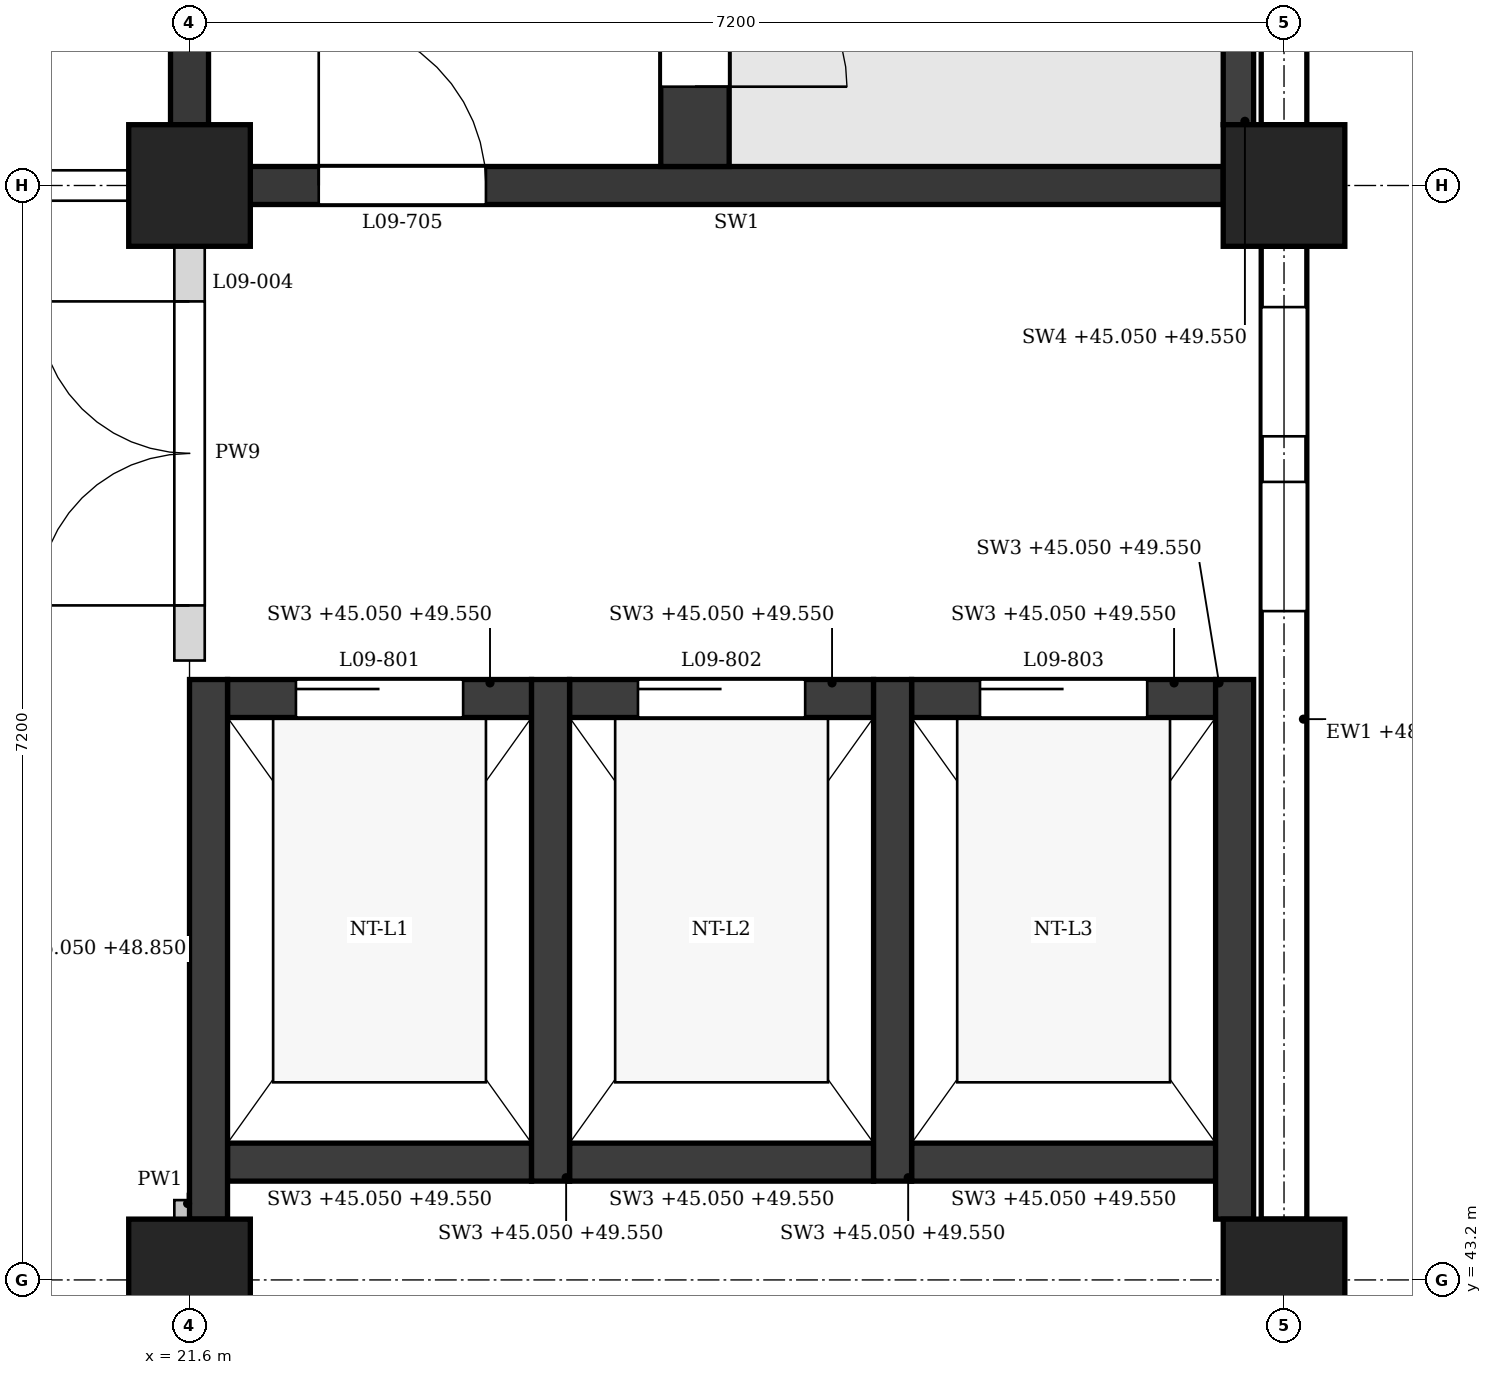
"""IFC4 building model, lengths in metres.
Left out: names, types, materials, properties, quantities, classifications, styles, units other than length and angle.
Written with IfcOpenShell. Run it as: python <this file> out.ifc"""

import sys

from ifc_helpers import new_model, si_unit, direction, frame, frame_2d, origin, origin_2d, place, context, subcontext, project, spatial, polyline, rectangle, outline, extrude, element, fill, save


model = new_model("IFC4")
c1 = context("Model", 3, precision=1e-05, world=origin(), true_north=direction((0.0, 1.0)))
c2 = subcontext(c1, "Body", "Model", "MODEL_VIEW")
j1 = project(units=[si_unit("LENGTHUNIT", "METRE"), si_unit("PLANEANGLEUNIT", "RADIAN")], contexts=[c1])
p1 = place(None, origin())
s1 = spatial("IfcSite", under=j1, at=p1, CompositionType="ELEMENT")
p2 = place(p1, origin())
s2 = spatial("IfcBuilding", under=s1, at=p2, CompositionType="ELEMENT")
p3 = place(p2, frame((0.0, 0.0, 45.3)))
s3 = spatial("IfcBuildingStorey", under=s2, at=p3, CompositionType="ELEMENT", Elevation=45.3)
for number, where, z_axis, x_axis in (
    (1, (21.6, 43.2, 0.0), (0.0, 0.0, 1.0), (1.0, 0.0, 0.0)),
    (2, (21.6, 50.4, 0.0), (0.0, 0.0, 1.0), (1.0, 0.0, 0.0)),
    (3, (28.8, 43.2, 0.0), (0.0, 0.0, 1.0), (1.0, 0.0, 0.0)),
    (4, (28.8, 50.4, 0.0), (0.0, 0.0, 1.0), (1.0, 0.0, 0.0)),
):
    element("IfcColumn", number, at=place(p3, frame(where, z_axis=z_axis, x_axis=x_axis)), inside=s3, PredefinedType="COLUMN", context=c2, shape_type="SweptSolid", body=[
        extrude(rectangle(XDim=0.8, YDim=0.8, at=origin_2d()), origin(), (0.0, 0.0, 1.0), 4.5),
    ])
p4 = place(p3, frame((28.8, 43.6, 0.0), z_axis=(0.0, 0.0, 1.0), x_axis=(0.0, 1.0, 0.0)))
e5 = element("IfcWall", 5, at=p4, inside=s3, PredefinedType="STANDARD", context=c2, shape_type="SweptSolid", body=[
    extrude(rectangle(XDim=6.4, YDim=0.3, at=frame_2d((3.2, 0.0))), origin(), (0.0, 0.0, 1.0), 3.65),
])
p5 = place(p4, frame((4.0, 0.0, 0.9)))
e6 = element("IfcOpeningElement", 6, at=p5, cuts=e5, PredefinedType="OPENING", context=c2, shape_type="SweptSolid", body=[
    extrude(outline(polyline([(0.0, 0.0), (0.85, 0.0), (0.85, 2.25), (0.425, 2.7), (0.0, 2.25), (0.0, 0.0)])), frame((0.0, 0.16, 0.0), z_axis=(0.0, -1.0, 0.0), x_axis=(1.0, 0.0, 0.0)), (0.0, 0.0, 1.0), 0.32),
])
p6 = place(p4, frame((5.15, 0.0, 0.9)))
e7 = element("IfcOpeningElement", 7, at=p6, cuts=e5, PredefinedType="OPENING", context=c2, shape_type="SweptSolid", body=[
    extrude(outline(polyline([(0.0, 0.0), (0.85, 0.0), (0.85, 2.25), (0.425, 2.7), (0.0, 2.25), (0.0, 0.0)])), frame((0.0, 0.16, 0.0), z_axis=(0.0, -1.0, 0.0), x_axis=(1.0, 0.0, 0.0)), (0.0, 0.0, 1.0), 0.32),
])
p7 = place(p3, frame((28.8, 50.8, 0.0), z_axis=(0.0, 0.0, 1.0), x_axis=(0.0, 1.0, 0.0)))
e8 = element("IfcWall", 8, at=p7, inside=s3, PredefinedType="STANDARD", context=c2, shape_type="SweptSolid", body=[
    extrude(rectangle(XDim=6.4, YDim=0.3, at=frame_2d((3.2, 0.0))), origin(), (0.0, 0.0, 1.0), 3.65),
])
p8 = place(p7, frame((0.95, 0.0, 0.9)))
e9 = element("IfcOpeningElement", 9, at=p8, cuts=e8, PredefinedType="OPENING", context=c2, shape_type="SweptSolid", body=[
    extrude(outline(polyline([(0.0, 0.0), (0.9, 0.0), (0.9, 2.25), (0.45, 2.7), (0.0, 2.25), (0.0, 0.0)])), frame((0.0, 0.16, 0.0), z_axis=(0.0, -1.0, 0.0), x_axis=(1.0, 0.0, 0.0)), (0.0, 0.0, 1.0), 0.32),
])
p9 = place(p7, frame((4.55, 0.0, 0.9)))
e10 = element("IfcOpeningElement", 10, at=p9, cuts=e8, PredefinedType="OPENING", context=c2, shape_type="SweptSolid", body=[
    extrude(outline(polyline([(0.0, 0.0), (0.9, 0.0), (0.9, 2.25), (0.45, 2.7), (0.0, 2.25), (0.0, 0.0)])), frame((0.0, 0.16, 0.0), z_axis=(0.0, -1.0, 0.0), x_axis=(1.0, 0.0, 0.0)), (0.0, 0.0, 1.0), 0.32),
])
p10 = place(p3, frame((22.0, 50.4, 0.0), z_axis=(0.0, 0.0, 1.0), x_axis=(1.0, 0.0, 0.0)))
e11 = element("IfcWall", 11, at=p10, inside=s3, PredefinedType="SHEAR", context=c2, shape_type="SweptSolid", body=[
    extrude(rectangle(XDim=6.4, YDim=0.25, at=frame_2d((3.2, 0.0))), origin(), (0.0, 0.0, 1.0), 3.55),
])
p11 = place(p10, frame((0.45, 0.0, 0.0)))
e12 = element("IfcOpeningElement", 12, at=p11, cuts=e11, PredefinedType="OPENING", context=c2, shape_type="SweptSolid", body=[
    extrude(rectangle(XDim=1.1, YDim=2.1, at=frame_2d((0.55, 1.05))), frame((0.0, 0.135, 0.0), z_axis=(0.0, -1.0, 0.0), x_axis=(1.0, 0.0, 0.0)), (0.0, 0.0, 1.0), 0.27),
])
p12 = place(p3, frame((21.6, 50.8, 0.0), z_axis=(0.0, 0.0, 1.0), x_axis=(0.0, 1.0, 0.0)))
e13 = element("IfcWall", 13, at=p12, inside=s3, PredefinedType="SHEAR", context=c2, shape_type="SweptSolid", body=[
    extrude(rectangle(XDim=6.4, YDim=0.25, at=frame_2d((3.2, 0.0))), origin(), (0.0, 0.0, 1.0), 3.55),
])
p13 = place(p3, frame((28.5, 50.8, -0.25), z_axis=(0.0, 0.0, 1.0), x_axis=(0.0, 1.0, 0.0)))
e14 = element("IfcWall", 14, at=p13, inside=s3, PredefinedType="SHEAR", context=c2, shape_type="SweptSolid", body=[
    extrude(rectangle(XDim=0.95, YDim=0.2, at=frame_2d((0.475, 0.0))), origin(), (0.0, 0.0, 1.0), 4.5),
])
p14 = place(p3, frame((24.925, 50.525, 0.0), z_axis=(0.0, 0.0, 1.0), x_axis=(0.0, 1.0, 0.0)))
e15 = element("IfcWall", 15, at=p14, inside=s3, PredefinedType="SHEAR", context=c2, shape_type="SweptSolid", body=[
    extrude(rectangle(XDim=6.925, YDim=0.45, at=frame_2d((3.462, 0.0))), origin(), (0.0, 0.0, 1.0), 4.25),
])
p15 = place(p14, frame((0.525, 0.0, 0.0)))
e16 = element("IfcOpeningElement", 16, at=p15, cuts=e15, PredefinedType="OPENING", context=c2, shape_type="SweptSolid", body=[
    extrude(rectangle(XDim=1.0, YDim=2.1, at=frame_2d((0.5, 1.05))), frame((0.0, 0.235, 0.0), z_axis=(0.0, -1.0, 0.0), x_axis=(1.0, 0.0, 0.0)), (0.0, 0.0, 1.0), 0.47),
])
p16 = place(p3, frame((21.725, 43.6, -0.25), z_axis=(0.0, 0.0, 1.0), x_axis=(0.0, 1.0, 0.0)))
e17 = element("IfcWall", 17, at=p16, inside=s3, PredefinedType="SHEAR", context=c2, shape_type="SweptSolid", body=[
    extrude(rectangle(XDim=3.55, YDim=0.25, at=frame_2d((1.775, 0.0))), origin(), (0.0, 0.0, 1.0), 3.8),
])
for number, where, z_axis, x_axis in (
    (18, (23.975, 43.85, -0.25), (0.0, 0.0, 1.0), (0.0, 1.0, 0.0)),
    (19, (26.225, 43.85, -0.25), (0.0, 0.0, 1.0), (0.0, 1.0, 0.0)),
):
    element("IfcWall", number, at=place(p3, frame(where, z_axis=z_axis, x_axis=x_axis)), inside=s3, PredefinedType="SHEAR", context=c2, shape_type="SweptSolid", body=[
        extrude(rectangle(XDim=3.3, YDim=0.25, at=frame_2d((1.65, 0.0))), origin(), (0.0, 0.0, 1.0), 4.5),
    ])
p17 = place(p3, frame((28.475, 43.6, -0.25), z_axis=(0.0, 0.0, 1.0), x_axis=(0.0, 1.0, 0.0)))
e20 = element("IfcWall", 20, at=p17, inside=s3, PredefinedType="SHEAR", context=c2, shape_type="SweptSolid", body=[
    extrude(rectangle(XDim=3.55, YDim=0.25, at=frame_2d((1.775, 0.0))), origin(), (0.0, 0.0, 1.0), 4.5),
])
p18 = place(p3, frame((21.85, 47.025, -0.25), z_axis=(0.0, 0.0, 1.0), x_axis=(1.0, 0.0, 0.0)))
e21 = element("IfcWall", 21, at=p18, inside=s3, PredefinedType="SHEAR", context=c2, shape_type="SweptSolid", body=[
    extrude(rectangle(XDim=2.0, YDim=0.25, at=frame_2d((1.0, 0.0))), origin(), (0.0, 0.0, 1.0), 4.5),
])
p19 = place(p18, frame((0.45, 0.0, 0.25)))
e22 = element("IfcOpeningElement", 22, at=p19, cuts=e21, PredefinedType="OPENING", context=c2, shape_type="SweptSolid", body=[
    extrude(rectangle(XDim=1.1, YDim=2.1, at=frame_2d((0.55, 1.05))), frame((0.0, 0.135, 0.0), z_axis=(0.0, -1.0, 0.0), x_axis=(1.0, 0.0, 0.0)), (0.0, 0.0, 1.0), 0.27),
])
p20 = place(p3, frame((21.85, 43.975, -0.25), z_axis=(0.0, 0.0, 1.0), x_axis=(1.0, 0.0, 0.0)))
e23 = element("IfcWall", 23, at=p20, inside=s3, PredefinedType="SHEAR", context=c2, shape_type="SweptSolid", body=[
    extrude(rectangle(XDim=2.0, YDim=0.25, at=frame_2d((1.0, 0.0))), origin(), (0.0, 0.0, 1.0), 4.5),
])
p21 = place(p3, frame((24.1, 47.025, -0.25), z_axis=(0.0, 0.0, 1.0), x_axis=(1.0, 0.0, 0.0)))
e24 = element("IfcWall", 24, at=p21, inside=s3, PredefinedType="SHEAR", context=c2, shape_type="SweptSolid", body=[
    extrude(rectangle(XDim=2.0, YDim=0.25, at=frame_2d((1.0, 0.0))), origin(), (0.0, 0.0, 1.0), 4.5),
])
p22 = place(p21, frame((0.45, 0.0, 0.25)))
e25 = element("IfcOpeningElement", 25, at=p22, cuts=e24, PredefinedType="OPENING", context=c2, shape_type="SweptSolid", body=[
    extrude(rectangle(XDim=1.1, YDim=2.1, at=frame_2d((0.55, 1.05))), frame((0.0, 0.135, 0.0), z_axis=(0.0, -1.0, 0.0), x_axis=(1.0, 0.0, 0.0)), (0.0, 0.0, 1.0), 0.27),
])
p23 = place(p3, frame((24.1, 43.975, -0.25), z_axis=(0.0, 0.0, 1.0), x_axis=(1.0, 0.0, 0.0)))
e26 = element("IfcWall", 26, at=p23, inside=s3, PredefinedType="SHEAR", context=c2, shape_type="SweptSolid", body=[
    extrude(rectangle(XDim=2.0, YDim=0.25, at=frame_2d((1.0, 0.0))), origin(), (0.0, 0.0, 1.0), 4.5),
])
p24 = place(p3, frame((26.35, 47.025, -0.25), z_axis=(0.0, 0.0, 1.0), x_axis=(1.0, 0.0, 0.0)))
e27 = element("IfcWall", 27, at=p24, inside=s3, PredefinedType="SHEAR", context=c2, shape_type="SweptSolid", body=[
    extrude(rectangle(XDim=2.0, YDim=0.25, at=frame_2d((1.0, 0.0))), origin(), (0.0, 0.0, 1.0), 4.5),
])
p25 = place(p24, frame((0.45, 0.0, 0.25)))
e28 = element("IfcOpeningElement", 28, at=p25, cuts=e27, PredefinedType="OPENING", context=c2, shape_type="SweptSolid", body=[
    extrude(rectangle(XDim=1.1, YDim=2.1, at=frame_2d((0.55, 1.05))), frame((0.0, 0.135, 0.0), z_axis=(0.0, -1.0, 0.0), x_axis=(1.0, 0.0, 0.0)), (0.0, 0.0, 1.0), 0.27),
])
p26 = place(p3, frame((26.35, 43.975, -0.25), z_axis=(0.0, 0.0, 1.0), x_axis=(1.0, 0.0, 0.0)))
e29 = element("IfcWall", 29, at=p26, inside=s3, PredefinedType="SHEAR", context=c2, shape_type="SweptSolid", body=[
    extrude(rectangle(XDim=2.0, YDim=0.25, at=frame_2d((1.0, 0.0))), origin(), (0.0, 0.0, 1.0), 4.5),
])
p27 = place(p3, frame((14.8, 50.4, 0.0), z_axis=(0.0, 0.0, 1.0), x_axis=(1.0, 0.0, 0.0)))
e30 = element("IfcWall", 30, at=p27, inside=s3, PredefinedType="PARTITIONING", context=c2, shape_type="SweptSolid", body=[
    extrude(rectangle(XDim=6.4, YDim=0.2, at=frame_2d((3.2, 0.0))), origin(), (0.0, 0.0, 1.0), 3.55),
])
p28 = place(p27, frame((4.3, 0.0, 0.0)))
e31 = element("IfcOpeningElement", 31, at=p28, cuts=e30, PredefinedType="OPENING", context=c2, shape_type="SweptSolid", body=[
    extrude(rectangle(XDim=1.0, YDim=2.1, at=frame_2d((0.5, 1.05))), frame((0.0, 0.11, 0.0), z_axis=(0.0, -1.0, 0.0), x_axis=(1.0, 0.0, 0.0)), (0.0, 0.0, 1.0), 0.22),
])
p29 = place(p3, frame((21.6, 43.6, 0.0), z_axis=(0.0, 0.0, 1.0), x_axis=(0.0, 1.0, 0.0)))
e32 = element("IfcWall", 32, at=p29, inside=s3, PredefinedType="PARTITIONING", context=c2, shape_type="SweptSolid", body=[
    extrude(rectangle(XDim=0.125, YDim=0.2, at=frame_2d((0.062, 0.0))), origin(), (0.0, 0.0, 1.0), 3.55),
])
p30 = place(p3, frame((21.6, 47.275, 0.0), z_axis=(0.0, 0.0, 1.0), x_axis=(0.0, 1.0, 0.0)))
e33 = element("IfcWall", 33, at=p30, inside=s3, PredefinedType="PARTITIONING", context=c2, shape_type="SweptSolid", body=[
    extrude(rectangle(XDim=2.725, YDim=0.2, at=frame_2d((1.363, 0.0))), origin(), (0.0, 0.0, 1.0), 3.55),
])
p31 = place(p30, frame((0.363, 0.0, 0.0)))
e34 = element("IfcOpeningElement", 34, at=p31, cuts=e33, PredefinedType="OPENING", context=c2, shape_type="SweptSolid", body=[
    extrude(rectangle(XDim=2.0, YDim=2.4, at=frame_2d((1.0, 1.2))), frame((0.0, 0.11, 0.0), z_axis=(0.0, -1.0, 0.0), x_axis=(1.0, 0.0, 0.0)), (0.0, 0.0, 1.0), 0.22),
])
p32 = place(p5, origin())
e35 = element("IfcWindow", 35, at=p32, inside=s3, PartitioningType="SINGLE_PANEL", PredefinedType="WINDOW", context=c2, shape_type="SweptSolid", body=[
    extrude(outline(polyline([(0.0, 0.0), (0.85, 0.0), (0.85, 2.25), (0.425, 2.7), (0.0, 2.25), (0.0, 0.0)])), frame((0.0, 0.03, 0.0), z_axis=(0.0, -1.0, 0.0), x_axis=(1.0, 0.0, 0.0)), (0.0, 0.0, 1.0), 0.06),
])
fill(e6, e35)
p33 = place(p6, origin())
e36 = element("IfcWindow", 36, at=p33, inside=s3, PartitioningType="SINGLE_PANEL", PredefinedType="WINDOW", context=c2, shape_type="SweptSolid", body=[
    extrude(outline(polyline([(0.0, 0.0), (0.85, 0.0), (0.85, 2.25), (0.425, 2.7), (0.0, 2.25), (0.0, 0.0)])), frame((0.0, 0.03, 0.0), z_axis=(0.0, -1.0, 0.0), x_axis=(1.0, 0.0, 0.0)), (0.0, 0.0, 1.0), 0.06),
])
fill(e7, e36)
p34 = place(p15, frame((1.0, 0.0, 0.0), z_axis=(0.0, 0.0, 1.0), x_axis=(-1.0, 0.0, 0.0)))
e37 = element("IfcDoor", 37, at=p34, inside=s3, OperationType="SINGLE_SWING_RIGHT", PredefinedType="DOOR", context=c2, shape_type="SweptSolid", body=[
    extrude(rectangle(XDim=1.0, YDim=2.1, at=frame_2d((0.5, 1.05))), frame((0.0, 0.025, 0.0), z_axis=(0.0, -1.0, 0.0), x_axis=(1.0, 0.0, 0.0)), (0.0, 0.0, 1.0), 0.05),
])
fill(e16, e37)
p35 = place(p11, origin())
e38 = element("IfcDoor", 38, at=p35, inside=s3, OperationType="SINGLE_SWING_LEFT", PredefinedType="DOOR", context=c2, shape_type="SweptSolid", body=[
    extrude(rectangle(XDim=1.1, YDim=2.1, at=frame_2d((0.55, 1.05))), frame((0.0, 0.025, 0.0), z_axis=(0.0, -1.0, 0.0), x_axis=(1.0, 0.0, 0.0)), (0.0, 0.0, 1.0), 0.05),
])
fill(e12, e38)
p36 = place(p19, origin())
e39 = element("IfcDoor", 39, at=p36, inside=s3, OperationType="SLIDING_TO_LEFT", PredefinedType="DOOR", context=c2, shape_type="SweptSolid", body=[
    extrude(rectangle(XDim=1.1, YDim=2.1, at=frame_2d((0.55, 1.05))), frame((0.0, 0.025, 0.0), z_axis=(0.0, -1.0, 0.0), x_axis=(1.0, 0.0, 0.0)), (0.0, 0.0, 1.0), 0.05),
])
fill(e22, e39)
p37 = place(p22, origin())
e40 = element("IfcDoor", 40, at=p37, inside=s3, OperationType="SLIDING_TO_LEFT", PredefinedType="DOOR", context=c2, shape_type="SweptSolid", body=[
    extrude(rectangle(XDim=1.1, YDim=2.1, at=frame_2d((0.55, 1.05))), frame((0.0, 0.025, 0.0), z_axis=(0.0, -1.0, 0.0), x_axis=(1.0, 0.0, 0.0)), (0.0, 0.0, 1.0), 0.05),
])
fill(e25, e40)
p38 = place(p25, origin())
e41 = element("IfcDoor", 41, at=p38, inside=s3, OperationType="SLIDING_TO_LEFT", PredefinedType="DOOR", context=c2, shape_type="SweptSolid", body=[
    extrude(rectangle(XDim=1.1, YDim=2.1, at=frame_2d((0.55, 1.05))), frame((0.0, 0.025, 0.0), z_axis=(0.0, -1.0, 0.0), x_axis=(1.0, 0.0, 0.0)), (0.0, 0.0, 1.0), 0.05),
])
fill(e28, e41)
p39 = place(p31, origin())
e42 = element("IfcDoor", 42, at=p39, inside=s3, OperationType="DOUBLE_DOOR_SINGLE_SWING", PredefinedType="DOOR", context=c2, shape_type="SweptSolid", body=[
    extrude(rectangle(XDim=2.0, YDim=2.4, at=frame_2d((1.0, 1.2))), frame((0.0, 0.025, 0.0), z_axis=(0.0, -1.0, 0.0), x_axis=(1.0, 0.0, 0.0)), (0.0, 0.0, 1.0), 0.05),
])
fill(e34, e42)
save(model, sys.argv[1])
